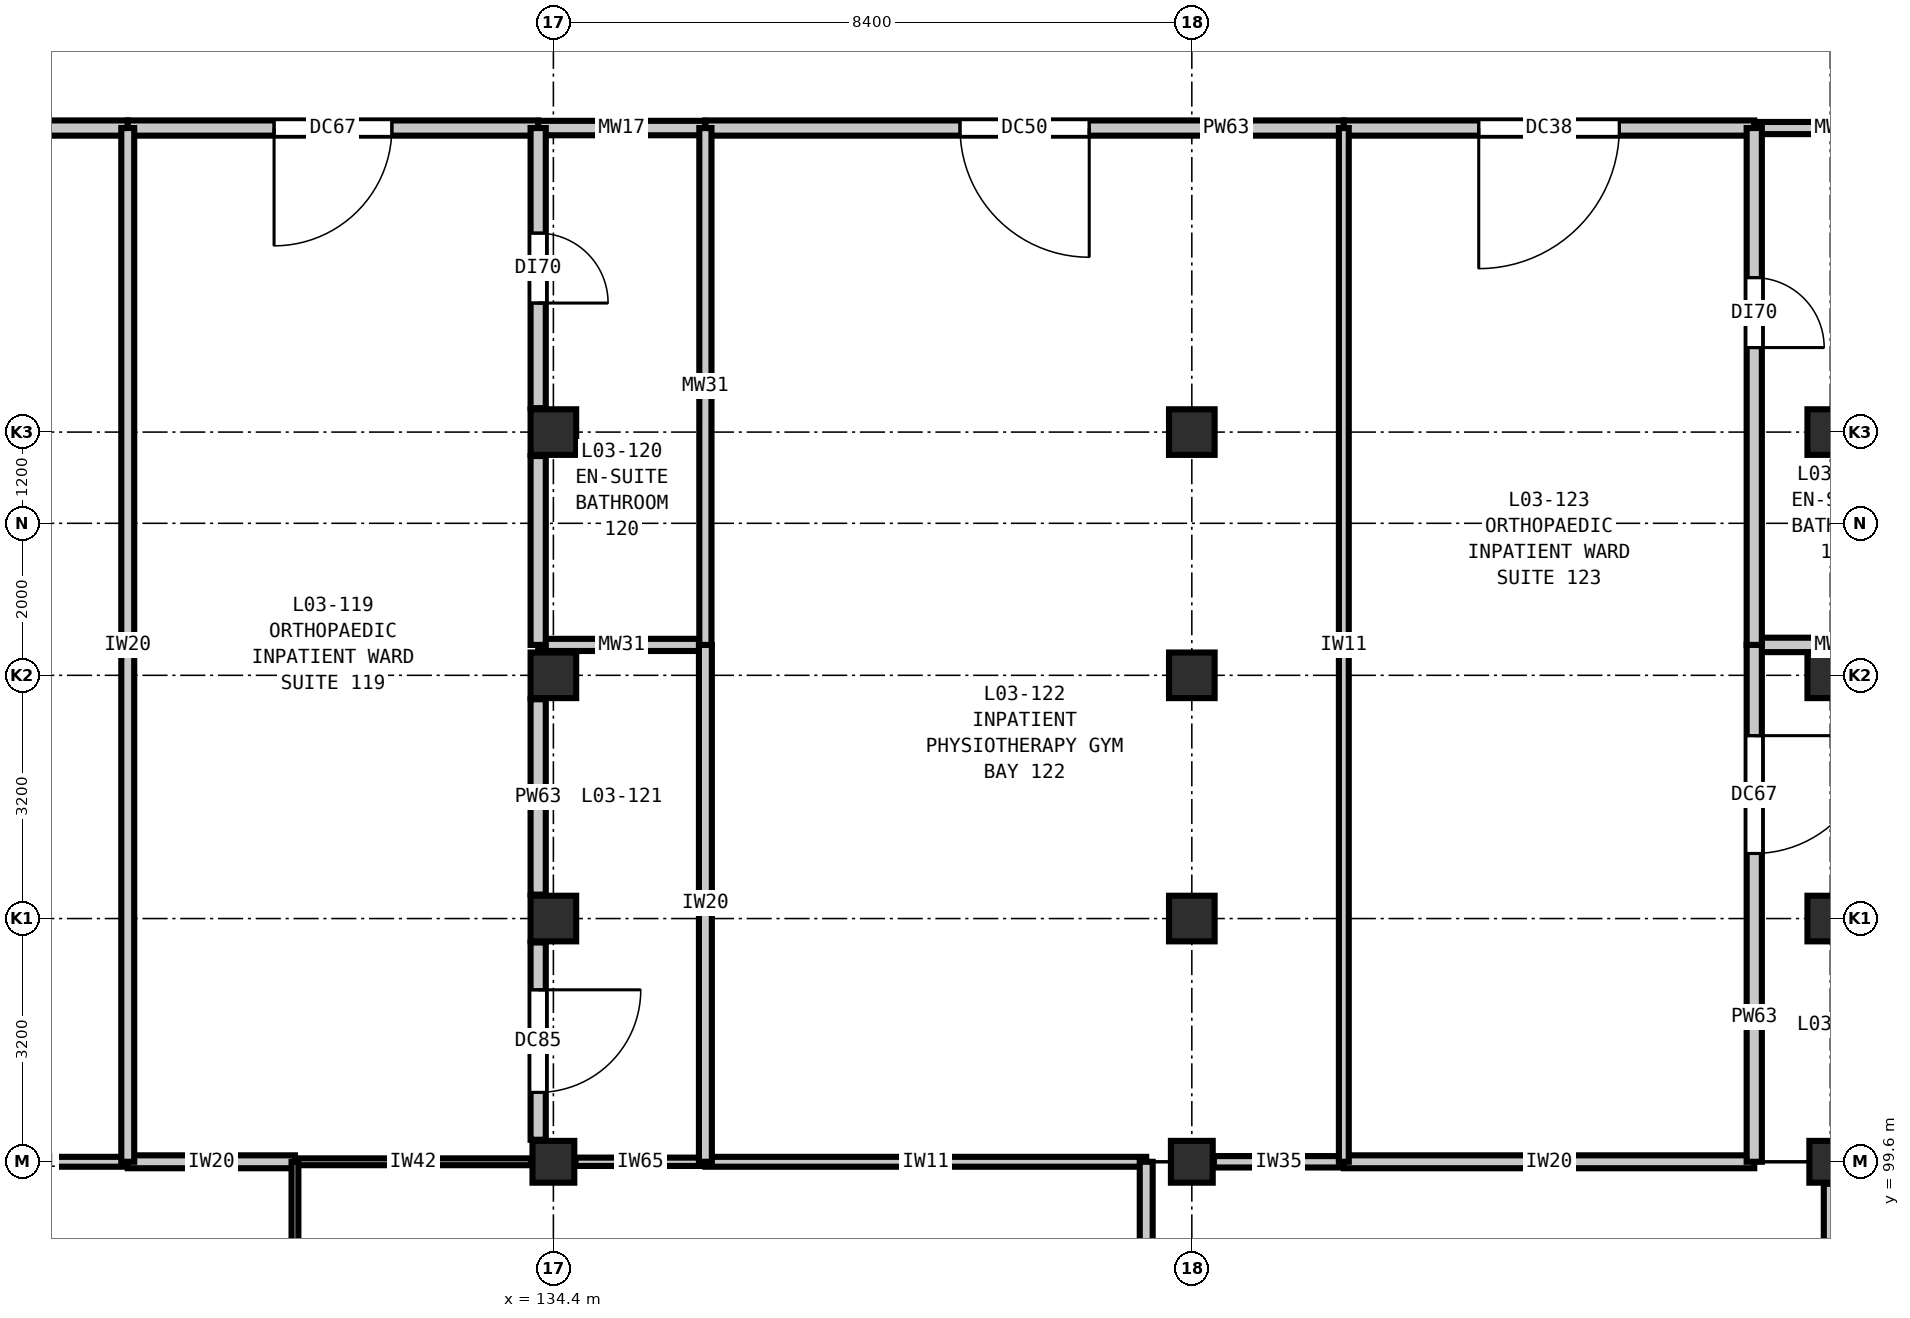
"""IFC4 building model, lengths in metres.
Left out: names, types, materials, properties, quantities, classifications, styles, units other than length and angle.
Written with IfcOpenShell. Run it as: python <this file> out.ifc"""

import sys

from ifc_helpers import new_model, si_unit, direction, frame, frame_2d, origin, origin_2d, place, context, subcontext, project, spatial, rectangle, extrude, element, fill, save


model = new_model("IFC4")
c1 = context("Model", 3, precision=1e-05, world=origin(), true_north=direction((0.0, 1.0)))
c2 = subcontext(c1, "Body", "Model", "MODEL_VIEW")
j1 = project(units=[si_unit("LENGTHUNIT", "METRE"), si_unit("PLANEANGLEUNIT", "RADIAN")], contexts=[c1])
p1 = place(None, origin())
s1 = spatial("IfcSite", under=j1, at=p1, CompositionType="ELEMENT")
p2 = place(p1, origin())
s2 = spatial("IfcBuilding", under=s1, at=p2, CompositionType="ELEMENT")
p3 = place(p2, frame((0.0, 0.0, 16.2)))
s3 = spatial("IfcBuildingStorey", under=s2, at=p3, CompositionType="ELEMENT", Elevation=16.2)
p4 = place(p3, frame((134.4, 99.6, 0.0), z_axis=(0.0, 0.0, 1.0), x_axis=(1.0, 0.0, 0.0)))
e1 = element("IfcColumn", 1, at=p4, inside=s3, PredefinedType="COLUMN", context=c2, shape_type="SweptSolid", body=[
    extrude(rectangle(XDim=0.55, YDim=0.55, at=origin_2d()), origin(), (0.0, 0.0, 1.0), 4.2),
])
for number, where, z_axis, x_axis in (
    (2, (134.4, 102.8, 0.0), (0.0, 0.0, 1.0), (1.0, 0.0, 0.0)),
    (3, (134.4, 106.0, 0.0), (0.0, 0.0, 1.0), (1.0, 0.0, 0.0)),
    (4, (134.4, 109.2, 0.0), (0.0, 0.0, 1.0), (1.0, 0.0, 0.0)),
):
    element("IfcColumn", number, at=place(p3, frame(where, z_axis=z_axis, x_axis=x_axis)), inside=s3, PredefinedType="COLUMN", context=c2, shape_type="SweptSolid", body=[
        extrude(rectangle(XDim=0.6, YDim=0.6, at=origin_2d()), origin(), (0.0, 0.0, 1.0), 4.2),
    ])
p5 = place(p3, frame((142.8, 99.6, 0.0), z_axis=(0.0, 0.0, 1.0), x_axis=(1.0, 0.0, 0.0)))
e5 = element("IfcColumn", 5, at=p5, inside=s3, PredefinedType="COLUMN", context=c2, shape_type="SweptSolid", body=[
    extrude(rectangle(XDim=0.55, YDim=0.55, at=origin_2d()), origin(), (0.0, 0.0, 1.0), 4.2),
])
for number, where, z_axis, x_axis in (
    (6, (142.8, 102.8, 0.0), (0.0, 0.0, 1.0), (1.0, 0.0, 0.0)),
    (7, (142.8, 106.0, 0.0), (0.0, 0.0, 1.0), (1.0, 0.0, 0.0)),
    (8, (142.8, 109.2, 0.0), (0.0, 0.0, 1.0), (1.0, 0.0, 0.0)),
):
    element("IfcColumn", number, at=place(p3, frame(where, z_axis=z_axis, x_axis=x_axis)), inside=s3, PredefinedType="COLUMN", context=c2, shape_type="SweptSolid", body=[
        extrude(rectangle(XDim=0.6, YDim=0.6, at=origin_2d()), origin(), (0.0, 0.0, 1.0), 4.2),
    ])
p6 = place(p3, frame((151.2, 99.6, 0.0), z_axis=(0.0, 0.0, 1.0), x_axis=(1.0, 0.0, 0.0)))
e9 = element("IfcColumn", 9, at=p6, inside=s3, PredefinedType="COLUMN", context=c2, shape_type="SweptSolid", body=[
    extrude(rectangle(XDim=0.55, YDim=0.55, at=origin_2d()), origin(), (0.0, 0.0, 1.0), 4.2),
])
for number, where, z_axis, x_axis in (
    (10, (151.2, 102.8, 0.0), (0.0, 0.0, 1.0), (1.0, 0.0, 0.0)),
    (11, (151.2, 106.0, 0.0), (0.0, 0.0, 1.0), (1.0, 0.0, 0.0)),
    (12, (151.2, 109.2, 0.0), (0.0, 0.0, 1.0), (1.0, 0.0, 0.0)),
):
    element("IfcColumn", number, at=place(p3, frame(where, z_axis=z_axis, x_axis=x_axis)), inside=s3, PredefinedType="COLUMN", context=c2, shape_type="SweptSolid", body=[
        extrude(rectangle(XDim=0.6, YDim=0.6, at=origin_2d()), origin(), (0.0, 0.0, 1.0), 4.2),
    ])
p7 = place(p3, frame((126.29, 99.6, 0.0), z_axis=(0.0, 0.0, 1.0), x_axis=(1.0, 0.0, 0.0)))
e13 = element("IfcWall", 13, at=p7, inside=s3, PredefinedType="PARTITIONING", context=c2, shape_type="SweptSolid", body=[
    extrude(rectangle(XDim=2.51, YDim=0.13, at=frame_2d((1.255, 0.0))), origin(), (0.0, 0.0, 1.0), 3.535),
])
p8 = place(p3, frame((128.8, 99.6, 0.0), z_axis=(0.0, 0.0, 1.0), x_axis=(1.0, 0.0, 0.0)))
e14 = element("IfcWall", 14, at=p8, inside=s3, PredefinedType="PARTITIONING", context=c2, shape_type="SweptSolid", body=[
    extrude(rectangle(XDim=2.2, YDim=0.17, at=frame_2d((1.1, 0.0))), origin(), (0.0, 0.0, 1.0), 3.535),
])
p9 = place(p3, frame((131.0, 99.6, 0.0), z_axis=(0.0, 0.0, 1.0), x_axis=(1.0, 0.0, 0.0)))
e15 = element("IfcWall", 15, at=p9, inside=s3, PredefinedType="PARTITIONING", context=c2, shape_type="SweptSolid", body=[
    extrude(rectangle(XDim=3.11, YDim=0.09, at=frame_2d((1.555, 0.0))), origin(), (0.0, 0.0, 1.0), 3.535),
])
p10 = place(p3, frame((134.69, 99.6, 0.0), z_axis=(0.0, 0.0, 1.0), x_axis=(1.0, 0.0, 0.0)))
e16 = element("IfcWall", 16, at=p10, inside=s3, PredefinedType="PARTITIONING", context=c2, shape_type="SweptSolid", body=[
    extrude(rectangle(XDim=1.71, YDim=0.11, at=frame_2d((0.855, 0.0))), origin(), (0.0, 0.0, 1.0), 3.535),
])
p11 = place(p3, frame((136.4, 99.6, 0.0), z_axis=(0.0, 0.0, 1.0), x_axis=(1.0, 0.0, 0.0)))
e17 = element("IfcWall", 17, at=p11, inside=s3, PredefinedType="PARTITIONING", context=c2, shape_type="SweptSolid", body=[
    extrude(rectangle(XDim=5.8, YDim=0.13, at=frame_2d((2.9, 0.0))), origin(), (0.0, 0.0, 1.0), 3.535),
])
p12 = place(p3, frame((143.09, 99.6, 0.0), z_axis=(0.0, 0.0, 1.0), x_axis=(1.0, 0.0, 0.0)))
e18 = element("IfcWall", 18, at=p12, inside=s3, PredefinedType="PARTITIONING", context=c2, shape_type="SweptSolid", body=[
    extrude(rectangle(XDim=1.71, YDim=0.15, at=frame_2d((0.855, 0.0))), origin(), (0.0, 0.0, 1.0), 3.535),
])
p13 = place(p3, frame((144.8, 99.6, 0.0), z_axis=(0.0, 0.0, 1.0), x_axis=(1.0, 0.0, 0.0)))
e19 = element("IfcWall", 19, at=p13, inside=s3, PredefinedType="PARTITIONING", context=c2, shape_type="SweptSolid", body=[
    extrude(rectangle(XDim=5.4, YDim=0.17, at=frame_2d((2.7, 0.0))), origin(), (0.0, 0.0, 1.0), 3.535),
])
p14 = place(p3, frame((134.2, 106.4, 0.0), z_axis=(0.0, 0.0, 1.0), x_axis=(1.0, 0.0, 0.0)))
e20 = element("IfcWall", 20, at=p14, inside=s3, PredefinedType="PLUMBINGWALL", context=c2, shape_type="SweptSolid", body=[
    extrude(rectangle(XDim=2.2, YDim=0.16, at=frame_2d((1.1, 0.0))), origin(), (0.0, 0.0, 1.0), 3.89),
])
p15 = place(p3, frame((150.2, 106.4, 0.0), z_axis=(0.0, 0.0, 1.0), x_axis=(1.0, 0.0, 0.0)))
e21 = element("IfcWall", 21, at=p15, inside=s3, PredefinedType="PLUMBINGWALL", context=c2, shape_type="SweptSolid", body=[
    extrude(rectangle(XDim=2.2, YDim=0.19, at=frame_2d((1.1, 0.0))), origin(), (0.0, 0.0, 1.0), 3.89),
])
p16 = place(p3, frame((120.4, 113.2, 0.0), z_axis=(0.0, 0.0, 1.0), x_axis=(1.0, 0.0, 0.0)))
e22 = element("IfcWall", 22, at=p16, inside=s3, PredefinedType="PARTITIONING", context=c2, shape_type="SweptSolid", body=[
    extrude(rectangle(XDim=8.4, YDim=0.2, at=frame_2d((4.2, 0.0))), origin(), (0.0, 0.0, 1.0), 3.89),
])
p17 = place(p16, frame((3.475, 0.0, 0.0)))
e23 = element("IfcOpeningElement", 23, at=p17, cuts=e22, PredefinedType="OPENING", context=c2, shape_type="SweptSolid", body=[
    extrude(rectangle(XDim=1.45, YDim=2.25, at=frame_2d((0.725, 1.125))), frame((0.0, 0.11, 0.0), z_axis=(0.0, -1.0, 0.0), x_axis=(1.0, 0.0, 0.0)), (0.0, 0.0, 1.0), 0.22),
])
p18 = place(p3, frame((128.8, 113.2, 0.0), z_axis=(0.0, 0.0, 1.0), x_axis=(1.0, 0.0, 0.0)))
e24 = element("IfcWall", 24, at=p18, inside=s3, PredefinedType="PARTITIONING", context=c2, shape_type="SweptSolid", body=[
    extrude(rectangle(XDim=5.4, YDim=0.2, at=frame_2d((2.7, 0.0))), origin(), (0.0, 0.0, 1.0), 3.89),
])
p19 = place(p18, frame((1.925, 0.0, 0.0)))
e25 = element("IfcOpeningElement", 25, at=p19, cuts=e24, PredefinedType="OPENING", context=c2, shape_type="SweptSolid", body=[
    extrude(rectangle(XDim=1.55, YDim=2.25, at=frame_2d((0.775, 1.125))), frame((0.0, 0.11, 0.0), z_axis=(0.0, -1.0, 0.0), x_axis=(1.0, 0.0, 0.0)), (0.0, 0.0, 1.0), 0.22),
])
p20 = place(p3, frame((134.2, 113.2, 0.0), z_axis=(0.0, 0.0, 1.0), x_axis=(1.0, 0.0, 0.0)))
e26 = element("IfcWall", 26, at=p20, inside=s3, PredefinedType="PLUMBINGWALL", context=c2, shape_type="SweptSolid", body=[
    extrude(rectangle(XDim=2.2, YDim=0.19, at=frame_2d((1.1, 0.0))), origin(), (0.0, 0.0, 1.0), 3.89),
])
p21 = place(p3, frame((136.4, 113.2, 0.0), z_axis=(0.0, 0.0, 1.0), x_axis=(1.0, 0.0, 0.0)))
e27 = element("IfcWall", 27, at=p21, inside=s3, PredefinedType="PARTITIONING", context=c2, shape_type="SweptSolid", body=[
    extrude(rectangle(XDim=8.4, YDim=0.2, at=frame_2d((4.2, 0.0))), origin(), (0.0, 0.0, 1.0), 3.89),
])
p22 = place(p21, frame((3.35, 0.0, 0.0)))
e28 = element("IfcOpeningElement", 28, at=p22, cuts=e27, PredefinedType="OPENING", context=c2, shape_type="SweptSolid", body=[
    extrude(rectangle(XDim=1.7, YDim=2.3, at=frame_2d((0.85, 1.15))), frame((0.0, 0.11, 0.0), z_axis=(0.0, -1.0, 0.0), x_axis=(1.0, 0.0, 0.0)), (0.0, 0.0, 1.0), 0.22),
])
p23 = place(p3, frame((144.8, 113.2, 0.0), z_axis=(0.0, 0.0, 1.0), x_axis=(1.0, 0.0, 0.0)))
e29 = element("IfcWall", 29, at=p23, inside=s3, PredefinedType="PARTITIONING", context=c2, shape_type="SweptSolid", body=[
    extrude(rectangle(XDim=5.4, YDim=0.2, at=frame_2d((2.7, 0.0))), origin(), (0.0, 0.0, 1.0), 3.89),
])
p24 = place(p23, frame((1.775, 0.0, 0.0)))
e30 = element("IfcOpeningElement", 30, at=p24, cuts=e29, PredefinedType="OPENING", context=c2, shape_type="SweptSolid", body=[
    extrude(rectangle(XDim=1.85, YDim=2.3, at=frame_2d((0.925, 1.15))), frame((0.0, 0.11, 0.0), z_axis=(0.0, -1.0, 0.0), x_axis=(1.0, 0.0, 0.0)), (0.0, 0.0, 1.0), 0.22),
])
p25 = place(p3, frame((150.2, 113.2, 0.0), z_axis=(0.0, 0.0, 1.0), x_axis=(1.0, 0.0, 0.0)))
e31 = element("IfcWall", 31, at=p25, inside=s3, PredefinedType="PLUMBINGWALL", context=c2, shape_type="SweptSolid", body=[
    extrude(rectangle(XDim=2.2, YDim=0.16, at=frame_2d((1.1, 0.0))), origin(), (0.0, 0.0, 1.0), 3.89),
])
p26 = place(p3, frame((128.8, 99.6, 0.0), z_axis=(0.0, 0.0, 1.0), x_axis=(0.0, 1.0, 0.0)))
e32 = element("IfcWall", 32, at=p26, inside=s3, PredefinedType="PARTITIONING", context=c2, shape_type="SweptSolid", body=[
    extrude(rectangle(XDim=13.6, YDim=0.17, at=frame_2d((6.8, 0.0))), origin(), (0.0, 0.0, 1.0), 3.89),
])
p27 = place(p3, frame((131.0, 88.6, 0.0), z_axis=(0.0, 0.0, 1.0), x_axis=(0.0, 1.0, 0.0)))
e33 = element("IfcWall", 33, at=p27, inside=s3, PredefinedType="PARTITIONING", context=c2, shape_type="SweptSolid", body=[
    extrude(rectangle(XDim=11.0, YDim=0.09, at=frame_2d((5.5, 0.0))), origin(), (0.0, 0.0, 1.0), 3.89),
])
p28 = place(p3, frame((134.2, 99.89, 0.0), z_axis=(0.0, 0.0, 1.0), x_axis=(0.0, 1.0, 0.0)))
e34 = element("IfcWall", 34, at=p28, inside=s3, PredefinedType="PARTITIONING", context=c2, shape_type="SweptSolid", body=[
    extrude(rectangle(XDim=2.595, YDim=0.2, at=frame_2d((1.298, 0.0))), origin(), (0.0, 0.0, 1.0), 3.585),
])
p29 = place(p28, frame((0.623, 0.0, 0.0)))
e35 = element("IfcOpeningElement", 35, at=p29, cuts=e34, PredefinedType="OPENING", context=c2, shape_type="SweptSolid", body=[
    extrude(rectangle(XDim=1.35, YDim=2.2, at=frame_2d((0.675, 1.1))), frame((0.0, 0.11, 0.0), z_axis=(0.0, -1.0, 0.0), x_axis=(1.0, 0.0, 0.0)), (0.0, 0.0, 1.0), 0.22),
])
p30 = place(p3, frame((134.2, 103.115, 0.0), z_axis=(0.0, 0.0, 1.0), x_axis=(0.0, 1.0, 0.0)))
e36 = element("IfcWall", 36, at=p30, inside=s3, PredefinedType="PARTITIONING", context=c2, shape_type="SweptSolid", body=[
    extrude(rectangle(XDim=2.57, YDim=0.2, at=frame_2d((1.285, 0.0))), origin(), (0.0, 0.0, 1.0), 3.585),
])
p31 = place(p3, frame((134.2, 109.515, 0.0), z_axis=(0.0, 0.0, 1.0), x_axis=(0.0, 1.0, 0.0)))
e37 = element("IfcWall", 37, at=p31, inside=s3, PredefinedType="PARTITIONING", context=c2, shape_type="SweptSolid", body=[
    extrude(rectangle(XDim=3.685, YDim=0.2, at=frame_2d((1.843, 0.0))), origin(), (0.0, 0.0, 1.0), 3.585),
])
p32 = place(p31, frame((1.383, 0.0, 0.0)))
e38 = element("IfcOpeningElement", 38, at=p32, cuts=e37, PredefinedType="OPENING", context=c2, shape_type="SweptSolid", body=[
    extrude(rectangle(XDim=0.92, YDim=2.1, at=frame_2d((0.46, 1.05))), frame((0.0, 0.11, 0.0), z_axis=(0.0, -1.0, 0.0), x_axis=(1.0, 0.0, 0.0)), (0.0, 0.0, 1.0), 0.22),
])
p33 = place(p3, frame((134.2, 106.4, 0.0), z_axis=(0.0, 0.0, 1.0), x_axis=(0.0, 1.0, 0.0)))
e39 = element("IfcWall", 39, at=p33, inside=s3, PredefinedType="PARTITIONING", context=c2, shape_type="SweptSolid", body=[
    extrude(rectangle(XDim=2.485, YDim=0.2, at=frame_2d((1.243, 0.0))), origin(), (0.0, 0.0, 1.0), 3.585),
])
p34 = place(p3, frame((136.4, 99.6, 0.0), z_axis=(0.0, 0.0, 1.0), x_axis=(0.0, 1.0, 0.0)))
e40 = element("IfcWall", 40, at=p34, inside=s3, PredefinedType="PARTITIONING", context=c2, shape_type="SweptSolid", body=[
    extrude(rectangle(XDim=6.8, YDim=0.17, at=frame_2d((3.4, 0.0))), origin(), (0.0, 0.0, 1.0), 3.89),
])
p35 = place(p3, frame((136.4, 106.4, 0.0), z_axis=(0.0, 0.0, 1.0), x_axis=(0.0, 1.0, 0.0)))
e41 = element("IfcWall", 41, at=p35, inside=s3, PredefinedType="PLUMBINGWALL", context=c2, shape_type="SweptSolid", body=[
    extrude(rectangle(XDim=6.8, YDim=0.16, at=frame_2d((3.4, 0.0))), origin(), (0.0, 0.0, 1.0), 3.89),
])
p36 = place(p3, frame((142.2, 88.6, 0.0), z_axis=(0.0, 0.0, 1.0), x_axis=(0.0, 1.0, 0.0)))
e42 = element("IfcWall", 42, at=p36, inside=s3, PredefinedType="PARTITIONING", context=c2, shape_type="SweptSolid", body=[
    extrude(rectangle(XDim=11.0, YDim=0.17, at=frame_2d((5.5, 0.0))), origin(), (0.0, 0.0, 1.0), 3.89),
])
p37 = place(p3, frame((144.8, 99.6, 0.0), z_axis=(0.0, 0.0, 1.0), x_axis=(0.0, 1.0, 0.0)))
e43 = element("IfcWall", 43, at=p37, inside=s3, PredefinedType="PARTITIONING", context=c2, shape_type="SweptSolid", body=[
    extrude(rectangle(XDim=13.6, YDim=0.13, at=frame_2d((6.8, 0.0))), origin(), (0.0, 0.0, 1.0), 3.89),
])
p38 = place(p3, frame((150.2, 99.6, 0.0), z_axis=(0.0, 0.0, 1.0), x_axis=(0.0, 1.0, 0.0)))
e44 = element("IfcWall", 44, at=p38, inside=s3, PredefinedType="PARTITIONING", context=c2, shape_type="SweptSolid", body=[
    extrude(rectangle(XDim=6.8, YDim=0.2, at=frame_2d((3.4, 0.0))), origin(), (0.0, 0.0, 1.0), 3.89),
])
p39 = place(p38, frame((4.056, 0.0, 0.0)))
e45 = element("IfcOpeningElement", 45, at=p39, cuts=e44, PredefinedType="OPENING", context=c2, shape_type="SweptSolid", body=[
    extrude(rectangle(XDim=1.55, YDim=2.25, at=frame_2d((0.775, 1.125))), frame((0.0, 0.11, 0.0), z_axis=(0.0, -1.0, 0.0), x_axis=(1.0, 0.0, 0.0)), (0.0, 0.0, 1.0), 0.22),
])
p40 = place(p3, frame((150.2, 106.4, 0.0), z_axis=(0.0, 0.0, 1.0), x_axis=(0.0, 1.0, 0.0)))
e46 = element("IfcWall", 46, at=p40, inside=s3, PredefinedType="PARTITIONING", context=c2, shape_type="SweptSolid", body=[
    extrude(rectangle(XDim=6.8, YDim=0.2, at=frame_2d((3.4, 0.0))), origin(), (0.0, 0.0, 1.0), 3.89),
])
p41 = place(p40, frame((3.912, 0.0, 0.0)))
e47 = element("IfcOpeningElement", 47, at=p41, cuts=e46, PredefinedType="OPENING", context=c2, shape_type="SweptSolid", body=[
    extrude(rectangle(XDim=0.92, YDim=2.1, at=frame_2d((0.46, 1.05))), frame((0.0, 0.11, 0.0), z_axis=(0.0, -1.0, 0.0), x_axis=(1.0, 0.0, 0.0)), (0.0, 0.0, 1.0), 0.22),
])
p42 = place(p3, frame((151.2, 91.49, 0.0), z_axis=(0.0, 0.0, 1.0), x_axis=(0.0, 1.0, 0.0)))
e48 = element("IfcWall", 48, at=p42, inside=s3, PredefinedType="PARTITIONING", context=c2, shape_type="SweptSolid", body=[
    extrude(rectangle(XDim=7.82, YDim=0.17, at=frame_2d((3.91, 0.0))), origin(), (0.0, 0.0, 1.0), 3.585),
])
p43 = place(p19, frame((1.55, 0.0, 0.0), z_axis=(0.0, 0.0, 1.0), x_axis=(-1.0, 0.0, 0.0)))
e49 = element("IfcDoor", 49, at=p43, inside=s3, OperationType="SINGLE_SWING_RIGHT", PredefinedType="DOOR", context=c2, shape_type="SweptSolid", body=[
    extrude(rectangle(XDim=1.55, YDim=2.25, at=frame_2d((0.775, 1.125))), frame((0.0, 0.025, 0.0), z_axis=(0.0, -1.0, 0.0), x_axis=(1.0, 0.0, 0.0)), (0.0, 0.0, 1.0), 0.05),
])
fill(e25, e49)
p44 = place(p22, frame((1.7, 0.0, 0.0), z_axis=(0.0, 0.0, 1.0), x_axis=(-1.0, 0.0, 0.0)))
e50 = element("IfcDoor", 50, at=p44, inside=s3, OperationType="SINGLE_SWING_LEFT", PredefinedType="DOOR", context=c2, shape_type="SweptSolid", body=[
    extrude(rectangle(XDim=1.7, YDim=2.3, at=frame_2d((0.85, 1.15))), frame((0.0, 0.025, 0.0), z_axis=(0.0, -1.0, 0.0), x_axis=(1.0, 0.0, 0.0)), (0.0, 0.0, 1.0), 0.05),
])
fill(e28, e50)
p45 = place(p24, frame((1.85, 0.0, 0.0), z_axis=(0.0, 0.0, 1.0), x_axis=(-1.0, 0.0, 0.0)))
e51 = element("IfcDoor", 51, at=p45, inside=s3, OperationType="SINGLE_SWING_RIGHT", PredefinedType="DOOR", context=c2, shape_type="SweptSolid", body=[
    extrude(rectangle(XDim=1.85, YDim=2.3, at=frame_2d((0.925, 1.15))), frame((0.0, 0.025, 0.0), z_axis=(0.0, -1.0, 0.0), x_axis=(1.0, 0.0, 0.0)), (0.0, 0.0, 1.0), 0.05),
])
fill(e30, e51)
p46 = place(p29, frame((1.35, 0.0, 0.0), z_axis=(0.0, 0.0, 1.0), x_axis=(-1.0, 0.0, 0.0)))
e52 = element("IfcDoor", 52, at=p46, inside=s3, OperationType="SINGLE_SWING_LEFT", PredefinedType="DOOR", context=c2, shape_type="SweptSolid", body=[
    extrude(rectangle(XDim=1.35, YDim=2.2, at=frame_2d((0.675, 1.1))), frame((0.0, 0.025, 0.0), z_axis=(0.0, -1.0, 0.0), x_axis=(1.0, 0.0, 0.0)), (0.0, 0.0, 1.0), 0.05),
])
fill(e35, e52)
p47 = place(p32, frame((0.92, 0.0, 0.0), z_axis=(0.0, 0.0, 1.0), x_axis=(-1.0, 0.0, 0.0)))
e53 = element("IfcDoor", 53, at=p47, inside=s3, OperationType="SINGLE_SWING_RIGHT", PredefinedType="DOOR", context=c2, shape_type="SweptSolid", body=[
    extrude(rectangle(XDim=0.92, YDim=2.1, at=frame_2d((0.46, 1.05))), frame((0.0, 0.025, 0.0), z_axis=(0.0, -1.0, 0.0), x_axis=(1.0, 0.0, 0.0)), (0.0, 0.0, 1.0), 0.05),
])
fill(e38, e53)
p48 = place(p39, frame((1.55, 0.0, 0.0), z_axis=(0.0, 0.0, 1.0), x_axis=(-1.0, 0.0, 0.0)))
e54 = element("IfcDoor", 54, at=p48, inside=s3, OperationType="SINGLE_SWING_LEFT", PredefinedType="DOOR", context=c2, shape_type="SweptSolid", body=[
    extrude(rectangle(XDim=1.55, YDim=2.25, at=frame_2d((0.775, 1.125))), frame((0.0, 0.025, 0.0), z_axis=(0.0, -1.0, 0.0), x_axis=(1.0, 0.0, 0.0)), (0.0, 0.0, 1.0), 0.05),
])
fill(e45, e54)
p49 = place(p41, frame((0.92, 0.0, 0.0), z_axis=(0.0, 0.0, 1.0), x_axis=(-1.0, 0.0, 0.0)))
e55 = element("IfcDoor", 55, at=p49, inside=s3, OperationType="SINGLE_SWING_RIGHT", PredefinedType="DOOR", context=c2, shape_type="SweptSolid", body=[
    extrude(rectangle(XDim=0.92, YDim=2.1, at=frame_2d((0.46, 1.05))), frame((0.0, 0.025, 0.0), z_axis=(0.0, -1.0, 0.0), x_axis=(1.0, 0.0, 0.0)), (0.0, 0.0, 1.0), 0.05),
])
fill(e47, e55)
save(model, sys.argv[1])
